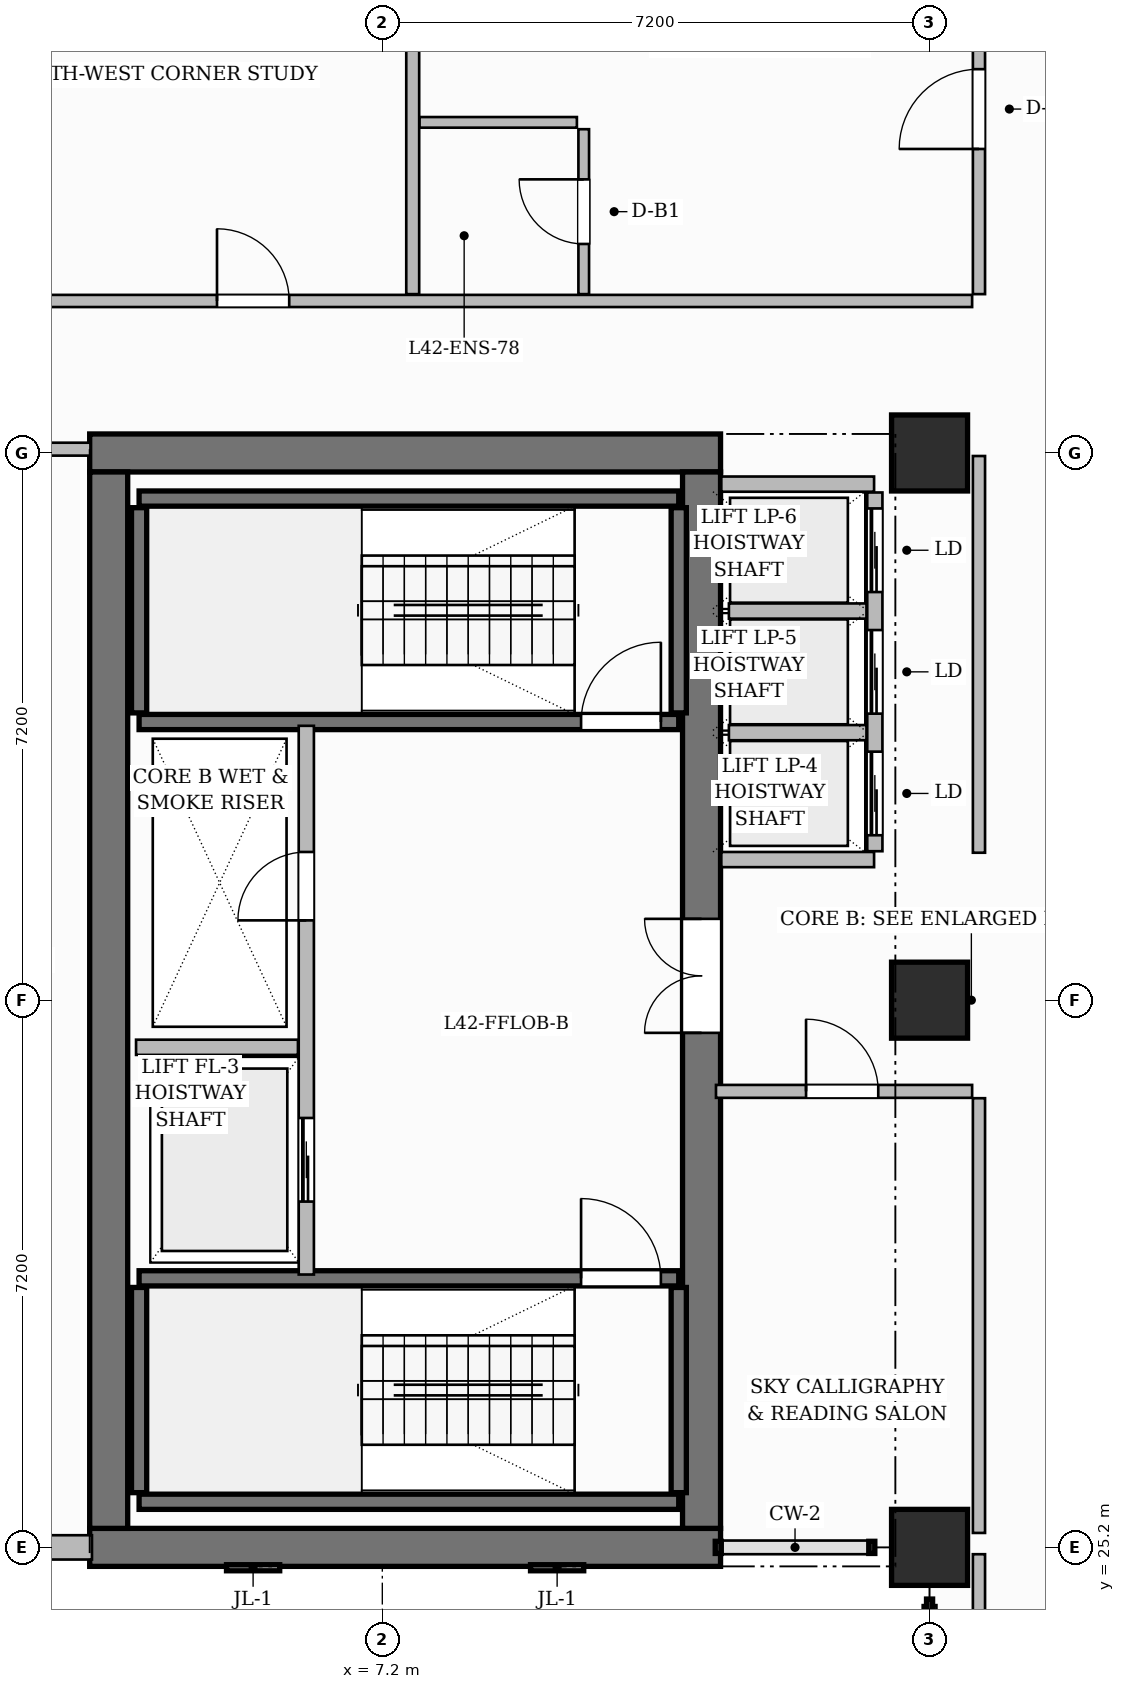
"""IFC4 building model, lengths in metres.
Left out: names, types, materials, properties, quantities, classifications, styles, units other than length and angle.
Written with IfcOpenShell. Run it as: python <this file> out.ifc"""

import sys

from ifc_helpers import new_model, si_unit, direction, frame, frame_2d, origin, origin_2d, place, context, subcontext, project, spatial, rectangle, extrude, source, transform, mapped, element, fill, save


model = new_model("IFC4")
c1 = context("Model", 3, precision=1e-05, world=origin(), true_north=direction((0.0, 1.0)))
c2 = subcontext(c1, "Body", "Model", "MODEL_VIEW")
j1 = project(units=[si_unit("LENGTHUNIT", "METRE"), si_unit("PLANEANGLEUNIT", "RADIAN")], contexts=[c1])
p1 = place(None, origin())
s1 = spatial("IfcSite", under=j1, at=p1, CompositionType="ELEMENT")
p2 = place(p1, origin())
s2 = spatial("IfcBuilding", under=s1, at=p2, CompositionType="ELEMENT")
p3 = place(p2, frame((0.0, 0.0, 169.55)))
s3 = spatial("IfcBuildingStorey", under=s2, at=p3, CompositionType="ELEMENT", Elevation=169.55)
for number, where, z_axis, x_axis in (
    (1, (3.35, 25.2, 0.0), (0.0, 0.0, 1.0), (1.0, 0.0, 0.0)),
    (2, (3.35, 39.6, 0.0), (0.0, 0.0, 1.0), (1.0, 0.0, 0.0)),
):
    element("IfcWall", number, at=place(p3, frame(where, z_axis=z_axis, x_axis=x_axis)), inside=s3, PredefinedType="SHEAR", context=c2, shape_type="SweptSolid", body=[
        extrude(rectangle(XDim=8.3, YDim=0.5, at=frame_2d((4.15, 0.0))), origin(), (0.0, 0.0, 1.0), 3.85),
    ])
p4 = place(p3, frame((3.6, 25.45, 0.0), z_axis=(0.0, 0.0, 1.0), x_axis=(0.0, 1.0, 0.0)))
e3 = element("IfcWall", 3, at=p4, inside=s3, PredefinedType="SHEAR", context=c2, shape_type="SweptSolid", body=[
    extrude(rectangle(XDim=13.9, YDim=0.5, at=frame_2d((6.95, 0.0))), origin(), (0.0, 0.0, 1.0), 3.85),
])
p5 = place(p3, frame((11.4, 25.45, 0.0), z_axis=(0.0, 0.0, 1.0), x_axis=(0.0, 1.0, 0.0)))
e4 = element("IfcWall", 4, at=p5, inside=s3, PredefinedType="SHEAR", context=c2, shape_type="SweptSolid", body=[
    extrude(rectangle(XDim=13.9, YDim=0.5, at=frame_2d((6.95, 0.0))), origin(), (0.0, 0.0, 1.0), 3.85),
])
p6 = place(p5, frame((6.52, 0.0, 0.0)))
e5 = element("IfcOpeningElement", 5, at=p6, cuts=e4, PredefinedType="OPENING", context=c2, shape_type="SweptSolid", body=[
    extrude(rectangle(XDim=1.5, YDim=2.2, at=frame_2d((0.75, 1.1))), frame((0.0, 0.26, 0.0), z_axis=(0.0, -1.0, 0.0), x_axis=(1.0, 0.0, 0.0)), (0.0, 0.0, 1.0), 0.52),
])
m1 = source(origin(), c2, "Body", "SweptSolid", [
    extrude(rectangle(XDim=1.0, YDim=1.0, at=origin_2d()), origin(), (0.0, 0.0, 1.0), 3.85),
])
for number, where, z_axis, x_axis in (
    (6, (14.4, 25.2, 0.0), (0.0, 0.0, 1.0), (1.0, 0.0, 0.0)),
    (7, (14.4, 32.4, 0.0), (0.0, 0.0, 1.0), (1.0, 0.0, 0.0)),
    (8, (14.4, 39.6, 0.0), (0.0, 0.0, 1.0), (1.0, 0.0, 0.0)),
):
    element("IfcColumn", number, at=place(p3, frame(where, z_axis=z_axis, x_axis=x_axis)), inside=s3, PredefinedType="COLUMN", context=c2, shape_type="MappedRepresentation", body=[
        mapped(m1, transform((0.0, 0.0, 0.0), scale=1.0)),
    ])
p7 = place(p3, frame((4.0, 25.8, 0.0), z_axis=(0.0, 0.0, 1.0), x_axis=(1.0, 0.0, 0.0)))
e9 = element("IfcWall", 9, at=p7, inside=s3, PredefinedType="SHEAR", context=c2, shape_type="SweptSolid", body=[
    extrude(rectangle(XDim=7.1, YDim=0.2, at=frame_2d((3.55, 0.0))), origin(), (0.0, 0.0, 1.0), 3.85),
])
for number, where, z_axis, x_axis in (
    (10, (4.0, 25.92, 0.0), (0.0, 0.0, 1.0), (0.0, 1.0, 0.0)),
    (11, (11.1, 25.92, 0.0), (0.0, 0.0, 1.0), (0.0, 1.0, 0.0)),
):
    element("IfcWall", number, at=place(p3, frame(where, z_axis=z_axis, x_axis=x_axis)), inside=s3, PredefinedType="SHEAR", context=c2, shape_type="SweptSolid", body=[
        extrude(rectangle(XDim=2.7, YDim=0.2, at=frame_2d((1.35, 0.0))), origin(), (0.0, 0.0, 1.0), 3.85),
    ])
p8 = place(p3, frame((4.0, 28.74, 0.0), z_axis=(0.0, 0.0, 1.0), x_axis=(1.0, 0.0, 0.0)))
e12 = element("IfcWall", 12, at=p8, inside=s3, PredefinedType="SHEAR", context=c2, shape_type="SweptSolid", body=[
    extrude(rectangle(XDim=7.1, YDim=0.2, at=frame_2d((3.55, 0.0))), origin(), (0.0, 0.0, 1.0), 3.85),
])
p9 = place(p8, frame((5.815, 0.0, 0.0)))
e13 = element("IfcOpeningElement", 13, at=p9, cuts=e12, PredefinedType="OPENING", context=c2, shape_type="SweptSolid", body=[
    extrude(rectangle(XDim=1.05, YDim=2.2, at=frame_2d((0.525, 1.1))), frame((0.0, 0.11, 0.0), z_axis=(0.0, -1.0, 0.0), x_axis=(1.0, 0.0, 0.0)), (0.0, 0.0, 1.0), 0.22),
])
p10 = place(p3, frame((4.0, 39.0, 0.0), z_axis=(0.0, 0.0, 1.0), x_axis=(1.0, 0.0, 0.0)))
e14 = element("IfcWall", 14, at=p10, inside=s3, PredefinedType="SHEAR", context=c2, shape_type="SweptSolid", body=[
    extrude(rectangle(XDim=7.1, YDim=0.2, at=frame_2d((3.55, 0.0))), origin(), (0.0, 0.0, 1.0), 3.85),
])
for number, where, z_axis, x_axis in (
    (15, (4.0, 36.18, 0.0), (0.0, 0.0, 1.0), (0.0, 1.0, 0.0)),
    (16, (11.1, 36.18, 0.0), (0.0, 0.0, 1.0), (0.0, 1.0, 0.0)),
):
    element("IfcWall", number, at=place(p3, frame(where, z_axis=z_axis, x_axis=x_axis)), inside=s3, PredefinedType="SHEAR", context=c2, shape_type="SweptSolid", body=[
        extrude(rectangle(XDim=2.7, YDim=0.2, at=frame_2d((1.35, 0.0))), origin(), (0.0, 0.0, 1.0), 3.85),
    ])
p11 = place(p3, frame((4.0, 36.06, 0.0), z_axis=(0.0, 0.0, 1.0), x_axis=(1.0, 0.0, 0.0)))
e17 = element("IfcWall", 17, at=p11, inside=s3, PredefinedType="SHEAR", context=c2, shape_type="SweptSolid", body=[
    extrude(rectangle(XDim=7.1, YDim=0.2, at=frame_2d((3.55, 0.0))), origin(), (0.0, 0.0, 1.0), 3.85),
])
p12 = place(p11, frame((5.815, 0.0, 0.0)))
e18 = element("IfcOpeningElement", 18, at=p12, cuts=e17, PredefinedType="OPENING", context=c2, shape_type="SweptSolid", body=[
    extrude(rectangle(XDim=1.05, YDim=2.2, at=frame_2d((0.525, 1.1))), frame((0.0, 0.11, 0.0), z_axis=(0.0, -1.0, 0.0), x_axis=(1.0, 0.0, 0.0)), (0.0, 0.0, 1.0), 0.22),
])
p13 = place(p3, frame((6.2, 28.79, 0.0), z_axis=(0.0, 0.0, 1.0), x_axis=(0.0, 1.0, 0.0)))
e19 = element("IfcWall", 19, at=p13, inside=s3, PredefinedType="PARTITIONING", context=c2, shape_type="SweptSolid", body=[
    extrude(rectangle(XDim=7.22, YDim=0.2, at=frame_2d((3.61, 0.0))), origin(), (0.0, 0.0, 1.0), 3.6),
])
p14 = place(p13, frame((4.66, 0.0, 0.0)))
e20 = element("IfcOpeningElement", 20, at=p14, cuts=e19, PredefinedType="OPENING", context=c2, shape_type="SweptSolid", body=[
    extrude(rectangle(XDim=0.9, YDim=2.1, at=frame_2d((0.45, 1.05))), frame((0.0, 0.11, 0.0), z_axis=(0.0, -1.0, 0.0), x_axis=(1.0, 0.0, 0.0)), (0.0, 0.0, 1.0), 0.22),
])
p15 = place(p13, frame((0.96, 0.0, 0.0)))
e21 = element("IfcOpeningElement", 21, at=p15, cuts=e19, PredefinedType="OPENING", context=c2, shape_type="SweptSolid", body=[
    extrude(rectangle(XDim=1.1, YDim=2.2, at=frame_2d((0.55, 1.1))), frame((0.0, 0.11, 0.0), z_axis=(0.0, -1.0, 0.0), x_axis=(1.0, 0.0, 0.0)), (0.0, 0.0, 1.0), 0.22),
])
p16 = place(p3, frame((3.96, 31.78, 0.0), z_axis=(0.0, 0.0, 1.0), x_axis=(1.0, 0.0, 0.0)))
e22 = element("IfcWall", 22, at=p16, inside=s3, PredefinedType="PARTITIONING", context=c2, shape_type="SweptSolid", body=[
    extrude(rectangle(XDim=2.13, YDim=0.2, at=frame_2d((1.065, 0.0))), origin(), (0.0, 0.0, 1.0), 3.6),
])
for number, where, z_axis, x_axis in (
    (23, (11.66, 34.25, 0.0), (0.0, 0.0, 1.0), (1.0, 0.0, 0.0)),
    (24, (11.66, 39.19, 0.0), (0.0, 0.0, 1.0), (1.0, 0.0, 0.0)),
):
    element("IfcWall", number, at=place(p3, frame(where, z_axis=z_axis, x_axis=x_axis)), inside=s3, PredefinedType="PARTITIONING", context=c2, shape_type="SweptSolid", body=[
        extrude(rectangle(XDim=2.01, YDim=0.2, at=frame_2d((1.005, 0.0))), origin(), (0.0, 0.0, 1.0), 3.6),
    ])
p17 = place(p3, frame((13.68, 34.36, 0.0), z_axis=(0.0, 0.0, 1.0), x_axis=(0.0, 1.0, 0.0)))
e25 = element("IfcWall", 25, at=p17, inside=s3, PredefinedType="PARTITIONING", context=c2, shape_type="SweptSolid", body=[
    extrude(rectangle(XDim=4.72, YDim=0.2, at=frame_2d((2.36, 0.0))), origin(), (0.0, 0.0, 1.0), 3.6),
])
p18 = place(p17, frame((0.21, 0.0, 0.0)))
e26 = element("IfcOpeningElement", 26, at=p18, cuts=e25, PredefinedType="OPENING", context=c2, shape_type="SweptSolid", body=[
    extrude(rectangle(XDim=1.1, YDim=2.2, at=frame_2d((0.55, 1.1))), frame((0.0, 0.11, 0.0), z_axis=(0.0, -1.0, 0.0), x_axis=(1.0, 0.0, 0.0)), (0.0, 0.0, 1.0), 0.22),
])
p19 = place(p17, frame((1.81, 0.0, 0.0)))
e27 = element("IfcOpeningElement", 27, at=p19, cuts=e25, PredefinedType="OPENING", context=c2, shape_type="SweptSolid", body=[
    extrude(rectangle(XDim=1.1, YDim=2.2, at=frame_2d((0.55, 1.1))), frame((0.0, 0.11, 0.0), z_axis=(0.0, -1.0, 0.0), x_axis=(1.0, 0.0, 0.0)), (0.0, 0.0, 1.0), 0.22),
])
p20 = place(p17, frame((3.41, 0.0, 0.0)))
e28 = element("IfcOpeningElement", 28, at=p20, cuts=e25, PredefinedType="OPENING", context=c2, shape_type="SweptSolid", body=[
    extrude(rectangle(XDim=1.1, YDim=2.2, at=frame_2d((0.55, 1.1))), frame((0.0, 0.11, 0.0), z_axis=(0.0, -1.0, 0.0), x_axis=(1.0, 0.0, 0.0)), (0.0, 0.0, 1.0), 0.22),
])
for number, where, z_axis, x_axis in (
    (29, (11.76, 35.92, 0.0), (0.0, 0.0, 1.0), (1.0, 0.0, 0.0)),
    (30, (11.76, 37.52, 0.0), (0.0, 0.0, 1.0), (1.0, 0.0, 0.0)),
):
    element("IfcWall", number, at=place(p3, frame(where, z_axis=z_axis, x_axis=x_axis)), inside=s3, PredefinedType="PARTITIONING", context=c2, shape_type="SweptSolid", body=[
        extrude(rectangle(XDim=1.81, YDim=0.2, at=frame_2d((0.905, 0.0))), origin(), (0.0, 0.0, 1.0), 3.6),
    ])
p21 = place(p3, frame((15.05, 11.16, 0.0), z_axis=(0.0, 0.0, 1.0), x_axis=(0.0, 1.0, 0.0)))
e31 = element("IfcWall", 31, at=p21, inside=s3, PredefinedType="PARTITIONING", context=c2, shape_type="SweptSolid", body=[
    extrude(rectangle(XDim=13.95, YDim=0.16, at=frame_2d((6.975, 0.0))), origin(), (0.0, 0.0, 1.0), 3.6),
])
p22 = place(p3, frame((0.24, 39.65, 0.0), z_axis=(0.0, 0.0, 1.0), x_axis=(1.0, 0.0, 0.0)))
e32 = element("IfcWall", 32, at=p22, inside=s3, PredefinedType="PARTITIONING", context=c2, shape_type="SweptSolid", body=[
    extrude(rectangle(XDim=3.12, YDim=0.17, at=frame_2d((1.56, 0.0))), origin(), (0.0, 0.0, 1.0), 3.6),
])
p23 = place(p22, frame((1.11, 0.0, 0.0)))
e33 = element("IfcOpeningElement", 33, at=p23, cuts=e32, PredefinedType="OPENING", context=c2, shape_type="SweptSolid", body=[
    extrude(rectangle(XDim=0.9, YDim=2.15, at=frame_2d((0.45, 1.075))), frame((0.0, 0.095, 0.0), z_axis=(0.0, -1.0, 0.0), x_axis=(1.0, 0.0, 0.0)), (0.0, 0.0, 1.0), 0.19),
])
p24 = place(p3, frame((15.05, 34.34, 0.0), z_axis=(0.0, 0.0, 1.0), x_axis=(0.0, 1.0, 0.0)))
e34 = element("IfcWall", 34, at=p24, inside=s3, PredefinedType="PARTITIONING", context=c2, shape_type="SweptSolid", body=[
    extrude(rectangle(XDim=5.22, YDim=0.16, at=frame_2d((2.61, 0.0))), origin(), (0.0, 0.0, 1.0), 3.6),
])
p25 = place(p3, frame((15.05, 41.69, 0.0), z_axis=(0.0, 0.0, 1.0), x_axis=(0.0, 1.0, 0.0)))
e35 = element("IfcWall", 35, at=p25, inside=s3, PredefinedType="PARTITIONING", context=c2, shape_type="SweptSolid", body=[
    extrude(rectangle(XDim=4.942, YDim=0.16, at=frame_2d((2.471, 0.0))), origin(), (0.0, 0.0, 1.0), 3.6),
])
p26 = place(p25, frame((1.91, 0.0, 0.0)))
e36 = element("IfcOpeningElement", 36, at=p26, cuts=e35, PredefinedType="OPENING", context=c2, shape_type="SweptSolid", body=[
    extrude(rectangle(XDim=1.05, YDim=2.25, at=frame_2d((0.525, 1.125))), frame((0.0, 0.09, 0.0), z_axis=(0.0, -1.0, 0.0), x_axis=(1.0, 0.0, 0.0)), (0.0, 0.0, 1.0), 0.18),
])
p27 = place(p3, frame((7.6, 41.69, 0.0), z_axis=(0.0, 0.0, 1.0), x_axis=(0.0, 1.0, 0.0)))
e37 = element("IfcWall", 37, at=p27, inside=s3, PredefinedType="PARTITIONING", context=c2, shape_type="SweptSolid", body=[
    extrude(rectangle(XDim=4.87, YDim=0.17, at=frame_2d((2.435, 0.0))), origin(), (0.0, 0.0, 1.0), 3.6),
])
p28 = place(p3, frame((0.168, 41.6, 0.0), z_axis=(0.0, 0.0, 1.0), x_axis=(1.0, 0.0, 0.0)))
e38 = element("IfcWall", 38, at=p28, inside=s3, PredefinedType="PARTITIONING", context=c2, shape_type="SweptSolid", body=[
    extrude(rectangle(XDim=14.792, YDim=0.16, at=frame_2d((7.396, 0.0))), origin(), (0.0, 0.0, 1.0), 3.085),
])
p29 = place(p28, frame((4.857, 0.0, 0.0)))
e39 = element("IfcOpeningElement", 39, at=p29, cuts=e38, PredefinedType="OPENING", context=c2, shape_type="SweptSolid", body=[
    extrude(rectangle(XDim=0.95, YDim=2.15, at=frame_2d((0.475, 1.075))), frame((0.0, 0.09, 0.0), z_axis=(0.0, -1.0, 0.0), x_axis=(1.0, 0.0, 0.0)), (0.0, 0.0, 1.0), 0.18),
])
p30 = place(p3, frame((7.69, 43.95, 0.0), z_axis=(0.0, 0.0, 1.0), x_axis=(1.0, 0.0, 0.0)))
e40 = element("IfcWall", 40, at=p30, inside=s3, PredefinedType="PARTITIONING", context=c2, shape_type="SweptSolid", body=[
    extrude(rectangle(XDim=2.07, YDim=0.14, at=frame_2d((1.035, 0.0))), origin(), (0.0, 0.0, 1.0), 3.085),
])
p31 = place(p3, frame((9.85, 41.69, 0.0), z_axis=(0.0, 0.0, 1.0), x_axis=(0.0, 1.0, 0.0)))
e41 = element("IfcWall", 41, at=p31, inside=s3, PredefinedType="PARTITIONING", context=c2, shape_type="SweptSolid", body=[
    extrude(rectangle(XDim=2.17, YDim=0.14, at=frame_2d((1.085, 0.0))), origin(), (0.0, 0.0, 1.0), 3.6),
])
p32 = place(p31, frame((0.66, 0.0, 0.0)))
e42 = element("IfcOpeningElement", 42, at=p32, cuts=e41, PredefinedType="OPENING", context=c2, shape_type="SweptSolid", body=[
    extrude(rectangle(XDim=0.85, YDim=2.1, at=frame_2d((0.425, 1.05))), frame((0.0, 0.08, 0.0), z_axis=(0.0, -1.0, 0.0), x_axis=(1.0, 0.0, 0.0)), (0.0, 0.0, 1.0), 0.16),
])
p33 = place(p3, frame((15.05, 25.39, 0.0), z_axis=(0.0, 0.0, 1.0), x_axis=(0.0, 1.0, 0.0)))
e43 = element("IfcWall", 43, at=p33, inside=s3, PredefinedType="PARTITIONING", context=c2, shape_type="SweptSolid", body=[
    extrude(rectangle(XDim=5.72, YDim=0.16, at=frame_2d((2.86, 0.0))), origin(), (0.0, 0.0, 1.0), 3.6),
])
p34 = place(p3, frame((11.59, 31.2, 0.0), z_axis=(0.0, 0.0, 1.0), x_axis=(1.0, 0.0, 0.0)))
e44 = element("IfcWall", 44, at=p34, inside=s3, PredefinedType="PARTITIONING", context=c2, shape_type="SweptSolid", body=[
    extrude(rectangle(XDim=3.37, YDim=0.17, at=frame_2d((1.685, 0.0))), origin(), (0.0, 0.0, 1.0), 3.6),
])
p35 = place(p34, frame((1.185, 0.0, 0.0)))
e45 = element("IfcOpeningElement", 45, at=p35, cuts=e44, PredefinedType="OPENING", context=c2, shape_type="SweptSolid", body=[
    extrude(rectangle(XDim=0.95, YDim=2.15, at=frame_2d((0.475, 1.075))), frame((0.0, 0.095, 0.0), z_axis=(0.0, -1.0, 0.0), x_axis=(1.0, 0.0, 0.0)), (0.0, 0.0, 1.0), 0.19),
])
p36 = place(p3, frame((0.0, 25.2, 0.0), z_axis=(0.0, 0.0, 1.0), x_axis=(1.0, 0.0, 0.0)))
e46 = element("IfcWall", 46, at=p36, inside=s3, PredefinedType="SOLIDWALL", context=c2, shape_type="SweptSolid", body=[
    extrude(rectangle(XDim=3.38, YDim=0.32, at=frame_2d((1.69, 0.0))), origin(), (0.0, 0.0, 1.0), 3.6),
])
p37 = place(p36, frame((1.205, 0.0, 0.8)))
e47 = element("IfcOpeningElement", 47, at=p37, cuts=e46, PredefinedType="OPENING", context=c2, shape_type="SweptSolid", body=[
    extrude(rectangle(XDim=1.4, YDim=1.85, at=frame_2d((0.7, 0.925))), frame((0.0, 0.17, 0.0), z_axis=(0.0, -1.0, 0.0), x_axis=(1.0, 0.0, 0.0)), (0.0, 0.0, 1.0), 0.34),
])
m2 = source(origin(), c2, "Body", "SweptSolid", [
    extrude(rectangle(XDim=1.05, YDim=2.2, at=frame_2d((0.525, 1.1))), frame((0.0, 0.025, 0.0), z_axis=(0.0, -1.0, 0.0), x_axis=(1.0, 0.0, 0.0)), (0.0, 0.0, 1.0), 0.05),
])
p38 = place(p9, origin())
e48 = element("IfcDoor", 48, at=p38, inside=s3, OperationType="SINGLE_SWING_LEFT", PredefinedType="DOOR", context=c2, shape_type="MappedRepresentation", body=[
    mapped(m2, transform((0.0, 0.0, 0.0), scale=1.0)),
])
fill(e13, e48)
p39 = place(p12, origin())
e49 = element("IfcDoor", 49, at=p39, inside=s3, OperationType="SINGLE_SWING_RIGHT", PredefinedType="DOOR", context=c2, shape_type="MappedRepresentation", body=[
    mapped(m2, transform((0.0, 0.0, 0.0), scale=1.0)),
])
fill(e18, e49)
m3 = source(origin(), c2, "Body", "SweptSolid", [
    extrude(rectangle(XDim=0.9, YDim=2.1, at=frame_2d((0.45, 1.05))), frame((0.0, 0.025, 0.0), z_axis=(0.0, -1.0, 0.0), x_axis=(1.0, 0.0, 0.0)), (0.0, 0.0, 1.0), 0.05),
])
p40 = place(p14, origin())
e50 = element("IfcDoor", 50, at=p40, inside=s3, OperationType="SINGLE_SWING_LEFT", PredefinedType="DOOR", context=c2, shape_type="MappedRepresentation", body=[
    mapped(m3, transform((0.0, 0.0, 0.0), scale=1.0)),
])
fill(e20, e50)
m4 = source(origin(), c2, "Body", "SweptSolid", [
    extrude(rectangle(XDim=1.5, YDim=2.2, at=frame_2d((0.75, 1.1))), frame((0.0, 0.025, 0.0), z_axis=(0.0, -1.0, 0.0), x_axis=(1.0, 0.0, 0.0)), (0.0, 0.0, 1.0), 0.05),
])
p41 = place(p6, origin())
e51 = element("IfcDoor", 51, at=p41, inside=s3, OperationType="DOUBLE_DOOR_SINGLE_SWING", PredefinedType="DOOR", context=c2, shape_type="MappedRepresentation", body=[
    mapped(m4, transform((0.0, 0.0, 0.0), scale=1.0)),
])
fill(e5, e51)
m5 = source(origin(), c2, "Body", "SweptSolid", [
    extrude(rectangle(XDim=0.95, YDim=2.15, at=frame_2d((0.475, 1.075))), frame((0.0, 0.025, 0.0), z_axis=(0.0, -1.0, 0.0), x_axis=(1.0, 0.0, 0.0)), (0.0, 0.0, 1.0), 0.05),
])
p42 = place(p29, origin())
e52 = element("IfcDoor", 52, at=p42, inside=s3, OperationType="SINGLE_SWING_LEFT", PredefinedType="DOOR", context=c2, shape_type="MappedRepresentation", body=[
    mapped(m5, transform((0.0, 0.0, 0.0), scale=1.0)),
])
fill(e39, e52)
m6 = source(origin(), c2, "Body", "SweptSolid", [
    extrude(rectangle(XDim=0.85, YDim=2.1, at=frame_2d((0.425, 1.05))), frame((0.0, 0.025, 0.0), z_axis=(0.0, -1.0, 0.0), x_axis=(1.0, 0.0, 0.0)), (0.0, 0.0, 1.0), 0.05),
])
p43 = place(p32, origin())
e53 = element("IfcDoor", 53, at=p43, inside=s3, OperationType="SINGLE_SWING_RIGHT", PredefinedType="DOOR", context=c2, shape_type="MappedRepresentation", body=[
    mapped(m6, transform((0.0, 0.0, 0.0), scale=1.0)),
])
fill(e42, e53)
m7 = source(origin(), c2, "Body", "SweptSolid", [
    extrude(rectangle(XDim=1.05, YDim=2.25, at=frame_2d((0.525, 1.125))), frame((0.0, 0.025, 0.0), z_axis=(0.0, -1.0, 0.0), x_axis=(1.0, 0.0, 0.0)), (0.0, 0.0, 1.0), 0.05),
])
p44 = place(p26, origin())
e54 = element("IfcDoor", 54, at=p44, inside=s3, OperationType="SINGLE_SWING_LEFT", PredefinedType="DOOR", context=c2, shape_type="MappedRepresentation", body=[
    mapped(m7, transform((0.0, 0.0, 0.0), scale=1.0)),
])
fill(e36, e54)
p45 = place(p35, origin())
e55 = element("IfcDoor", 55, at=p45, inside=s3, OperationType="SINGLE_SWING_LEFT", PredefinedType="DOOR", context=c2, shape_type="MappedRepresentation", body=[
    mapped(m5, transform((0.0, 0.0, 0.0), scale=1.0)),
])
fill(e45, e55)
m8 = source(origin(), c2, "Body", "SweptSolid", [
    extrude(rectangle(XDim=1.1, YDim=2.2, at=frame_2d((0.55, 1.1))), frame((0.0, 0.025, 0.0), z_axis=(0.0, -1.0, 0.0), x_axis=(1.0, 0.0, 0.0)), (0.0, 0.0, 1.0), 0.05),
])
p46 = place(p15, origin())
e56 = element("IfcDoor", 56, at=p46, inside=s3, OperationType="SLIDING_TO_LEFT", PredefinedType="DOOR", context=c2, shape_type="MappedRepresentation", body=[
    mapped(m8, transform((0.0, 0.0, 0.0), scale=1.0)),
])
fill(e21, e56)
p47 = place(p18, origin())
e57 = element("IfcDoor", 57, at=p47, inside=s3, OperationType="SLIDING_TO_LEFT", PredefinedType="DOOR", context=c2, shape_type="MappedRepresentation", body=[
    mapped(m8, transform((0.0, 0.0, 0.0), scale=1.0)),
])
fill(e26, e57)
p48 = place(p19, origin())
e58 = element("IfcDoor", 58, at=p48, inside=s3, OperationType="SLIDING_TO_LEFT", PredefinedType="DOOR", context=c2, shape_type="MappedRepresentation", body=[
    mapped(m8, transform((0.0, 0.0, 0.0), scale=1.0)),
])
fill(e27, e58)
p49 = place(p20, origin())
e59 = element("IfcDoor", 59, at=p49, inside=s3, OperationType="SLIDING_TO_LEFT", PredefinedType="DOOR", context=c2, shape_type="MappedRepresentation", body=[
    mapped(m8, transform((0.0, 0.0, 0.0), scale=1.0)),
])
fill(e28, e59)
save(model, sys.argv[1])
